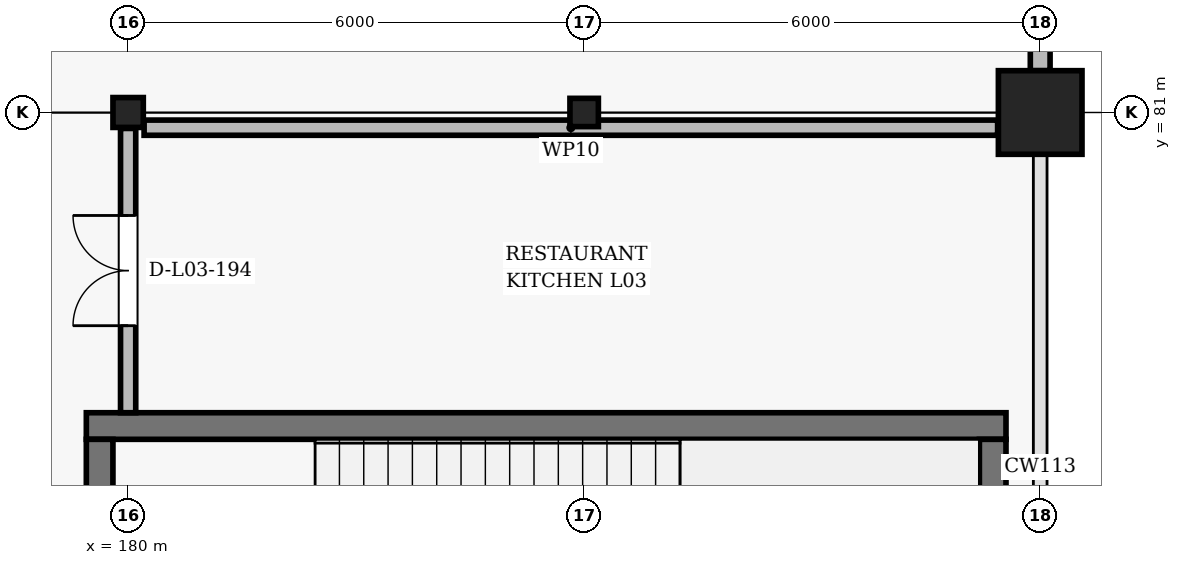
"""IFC4 building model, lengths in metres.
Left out: names, types, materials, properties, quantities, classifications, styles, units other than length and angle.
Written with IfcOpenShell. Run it as: python <this file> out.ifc"""

import sys

from ifc_helpers import new_model, si_unit, direction, frame, frame_2d, origin, origin_2d, place, context, subcontext, project, spatial, rectangle, i_section, extrude, element, fill, save


model = new_model("IFC4")
c1 = context("Model", 3, precision=1e-05, world=origin(), true_north=direction((0.0, 1.0)))
c2 = subcontext(c1, "Body", "Model", "MODEL_VIEW")
j1 = project(units=[si_unit("LENGTHUNIT", "METRE"), si_unit("PLANEANGLEUNIT", "RADIAN")], contexts=[c1])
p1 = place(None, origin())
s1 = spatial("IfcSite", under=j1, at=p1, CompositionType="ELEMENT")
p2 = place(p1, origin())
s2 = spatial("IfcBuilding", under=s1, at=p2, CompositionType="ELEMENT")
p3 = place(p2, frame((0.0, 0.0, 15.6)))
s3 = spatial("IfcBuildingStorey", under=s2, at=p3, CompositionType="ELEMENT", Elevation=15.6)
p4 = place(p3, frame((180.0, 81.0, 0.0), z_axis=(0.0, 0.0, 1.0), x_axis=(1.0, 0.0, 0.0)))
e1 = element("IfcColumn", 1, at=p4, inside=s3, PredefinedType="COLUMN", context=c2, shape_type="SweptSolid", body=[
    extrude(i_section(OverallWidth=0.399, OverallDepth=0.393, WebThickness=0.023, FlangeThickness=0.037, FilletRadius=0.018, at=origin_2d()), origin(), (0.0, 0.0, 1.0), 4.8),
])
p5 = place(p3, frame((186.0, 81.0, 0.0), z_axis=(0.0, 0.0, 1.0), x_axis=(1.0, 0.0, 0.0)))
e2 = element("IfcColumn", 2, at=p5, inside=s3, PredefinedType="COLUMN", context=c2, shape_type="SweptSolid", body=[
    extrude(i_section(OverallWidth=0.374, OverallDepth=0.372, WebThickness=0.016, FlangeThickness=0.026, FilletRadius=0.016, at=origin_2d()), origin(), (0.0, 0.0, 1.0), 4.8),
])
p6 = place(p3, frame((192.0, 81.0, 0.0), z_axis=(0.0, 0.0, 1.0), x_axis=(1.0, 0.0, 0.0)))
e3 = element("IfcColumn", 3, at=p6, inside=s3, PredefinedType="COLUMN", context=c2, shape_type="SweptSolid", body=[
    extrude(rectangle(XDim=1.1, YDim=1.1, at=origin_2d()), origin(), (0.0, 0.0, 1.0), 4.8),
])
p7 = place(p3, frame((192.0, 89.8, 0.0), z_axis=(0.0, 0.0, 1.0), x_axis=(0.0, -1.0, 0.0)))
e4 = element("IfcWall", 4, at=p7, inside=s3, PredefinedType="SOLIDWALL", context=c2, shape_type="SweptSolid", body=[
    extrude(rectangle(XDim=8.25, YDim=0.26, at=frame_2d((4.125, 0.0))), origin(), (0.0, 0.0, 1.0), 4.046),
])
p8 = place(p3, frame((191.55, 76.875, 0.0), z_axis=(0.0, 0.0, 1.0), x_axis=(-1.0, 0.0, 0.0)))
e5 = element("IfcWall", 5, at=p8, inside=s3, PredefinedType="SHEAR", context=c2, shape_type="SweptSolid", body=[
    extrude(rectangle(XDim=12.1, YDim=0.35, at=frame_2d((6.05, 0.0))), origin(), (0.0, 0.0, 1.0), 4.6),
])
p9 = place(p3, frame((179.625, 76.7, 0.0), z_axis=(0.0, 0.0, 1.0), x_axis=(0.0, -1.0, 0.0)))
e6 = element("IfcWall", 6, at=p9, inside=s3, PredefinedType="SHEAR", context=c2, shape_type="SweptSolid", body=[
    extrude(rectangle(XDim=5.5, YDim=0.35, at=frame_2d((2.75, 0.0))), origin(), (0.0, 0.0, 1.0), 4.6),
])
p10 = place(p9, frame((1.85, 0.0, 0.0)))
e7 = element("IfcOpeningElement", 7, at=p10, cuts=e6, PredefinedType="OPENING", context=c2, shape_type="SweptSolid", body=[
    extrude(rectangle(XDim=1.8, YDim=2.2, at=frame_2d((0.9, 1.1))), frame((0.0, 0.185, 0.0), z_axis=(0.0, -1.0, 0.0), x_axis=(1.0, 0.0, 0.0)), (0.0, 0.0, 1.0), 0.37),
])
p11 = place(p3, frame((191.375, 71.2, 0.0), z_axis=(0.0, 0.0, 1.0), x_axis=(0.0, 1.0, 0.0)))
e8 = element("IfcWall", 8, at=p11, inside=s3, PredefinedType="SHEAR", context=c2, shape_type="SweptSolid", body=[
    extrude(rectangle(XDim=5.5, YDim=0.35, at=frame_2d((2.75, 0.0))), origin(), (0.0, 0.0, 1.0), 4.6),
])
p12 = place(p3, frame((180.21, 80.8, 0.0), z_axis=(0.0, 0.0, 1.0), x_axis=(1.0, 0.0, 0.0)))
e9 = element("IfcWall", 9, at=p12, inside=s3, PredefinedType="PARTITIONING", context=c2, shape_type="SweptSolid", body=[
    extrude(rectangle(XDim=11.23, YDim=0.2, at=frame_2d((5.615, 0.0))), origin(), (0.0, 0.0, 1.0), 3.812),
])
p13 = place(p3, frame((180.0, 77.05, 0.0), z_axis=(0.0, 0.0, 1.0), x_axis=(0.0, 1.0, 0.0)))
e10 = element("IfcWall", 10, at=p13, inside=s3, PredefinedType="PARTITIONING", context=c2, shape_type="SweptSolid", body=[
    extrude(rectangle(XDim=3.74, YDim=0.2, at=frame_2d((1.87, 0.0))), origin(), (0.0, 0.0, 1.0), 3.901),
])
p14 = place(p13, frame((1.145, 0.0, 0.0)))
e11 = element("IfcOpeningElement", 11, at=p14, cuts=e10, PredefinedType="OPENING", context=c2, shape_type="SweptSolid", body=[
    extrude(rectangle(XDim=1.45, YDim=2.3, at=frame_2d((0.725, 1.15))), frame((0.0, 0.11, 0.0), z_axis=(0.0, -1.0, 0.0), x_axis=(1.0, 0.0, 0.0)), (0.0, 0.0, 1.0), 0.22),
])
p15 = place(p14, origin())
e12 = element("IfcDoor", 12, at=p15, inside=s3, OperationType="DOUBLE_DOOR_SINGLE_SWING", PredefinedType="DOOR", context=c2, shape_type="SweptSolid", body=[
    extrude(rectangle(XDim=1.45, YDim=2.3, at=frame_2d((0.725, 1.15))), frame((0.0, 0.025, 0.0), z_axis=(0.0, -1.0, 0.0), x_axis=(1.0, 0.0, 0.0)), (0.0, 0.0, 1.0), 0.05),
])
fill(e11, e12)
save(model, sys.argv[1])
